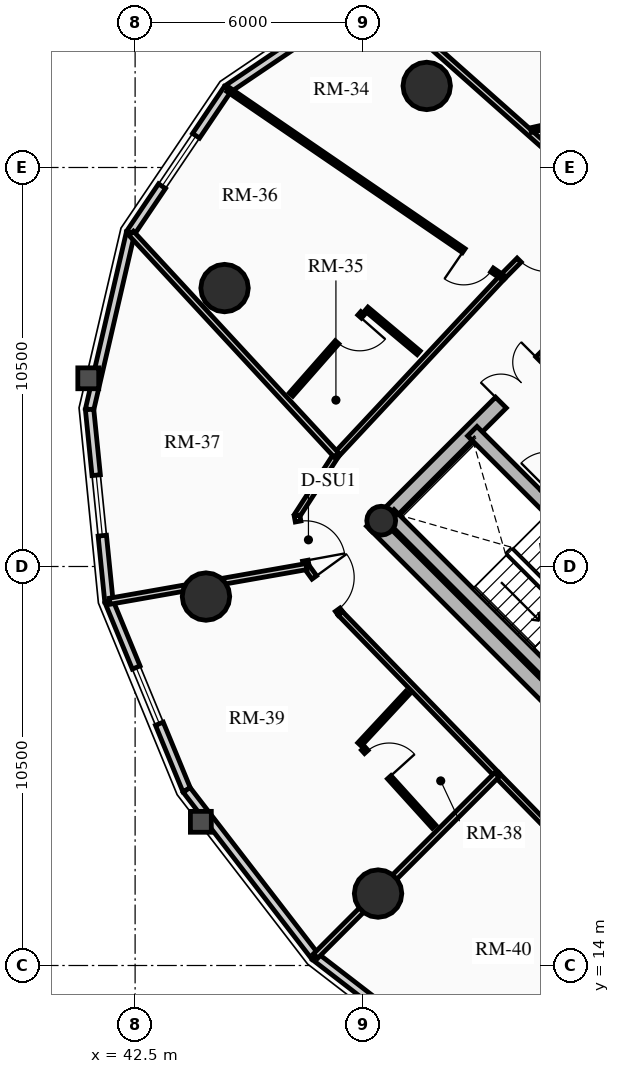
"""IFC4 building model, lengths in metres.
Left out: names, types, materials, properties, quantities, classifications, styles, units other than length and angle.
Written with IfcOpenShell. Run it as: python <this file> out.ifc"""

import sys

from ifc_helpers import new_model, si_unit, direction, frame, frame_2d, origin, origin_2d, place, context, subcontext, project, spatial, rectangle, circle, hollow_circle, extrude, source, transform, mapped, element, fill, save


model = new_model("IFC4")
c1 = context("Model", 3, precision=1e-05, world=origin(), true_north=direction((0.0, 1.0)))
c2 = subcontext(c1, "Body", "Model", "MODEL_VIEW")
j1 = project(units=[si_unit("LENGTHUNIT", "METRE"), si_unit("PLANEANGLEUNIT", "RADIAN")], contexts=[c1])
p1 = place(None, origin())
s1 = spatial("IfcSite", under=j1, at=p1, CompositionType="ELEMENT")
p2 = place(p1, origin())
s2 = spatial("IfcBuilding", under=s1, at=p2, CompositionType="ELEMENT")
p3 = place(p2, frame((0.0, 0.0, 157.42)))
s3 = spatial("IfcBuildingStorey", under=s2, at=p3, CompositionType="ELEMENT", Elevation=157.42)
p4 = place(p3, frame((58.702, 15.732, 0.0), z_axis=(0.0, 0.0, 1.0), x_axis=(-0.707106781187, 0.707106781187, 0.0)))
e1 = element("IfcWall", 1, at=p4, inside=s3, PredefinedType="SHEAR", context=c2, shape_type="SweptSolid", body=[
    extrude(rectangle(XDim=14.1, YDim=0.4, at=frame_2d((7.05, 0.0))), origin(), (0.0, 0.0, 1.0), 2.91),
])
p5 = place(p3, frame((48.873, 25.561, 0.0), z_axis=(0.0, 0.0, 1.0), x_axis=(0.707106781187, 0.707106781187, 0.0)))
e2 = element("IfcWall", 2, at=p5, inside=s3, PredefinedType="SHEAR", context=c2, shape_type="SweptSolid", body=[
    extrude(rectangle(XDim=10.7, YDim=0.4, at=frame_2d((5.35, 0.0))), origin(), (0.0, 0.0, 1.0), 2.91),
])
m1 = source(origin(), c2, "Body", "SweptSolid", [
    extrude(rectangle(XDim=1.5, YDim=2.02, at=frame_2d((0.75, 1.01))), frame((0.0, 0.21, 0.0), z_axis=(0.0, -1.0, 0.0), x_axis=(1.0, 0.0, 0.0)), (0.0, 0.0, 1.0), 0.42),
])
p6 = place(p5, frame((4.6, 0.0, 0.0)))
e3 = element("IfcOpeningElement", 3, at=p6, cuts=e2, PredefinedType="OPENING", context=c2, shape_type="MappedRepresentation", body=[
    mapped(m1, transform((0.0, 0.0, 0.0), x_axis=(1.0, 0.0, 0.0), y_axis=(0.0, 1.0, 0.0), z_axis=(0.0, 0.0, 1.0), scale=1.0)),
])
p7 = place(p3, frame((61.06, 18.373, 0.0), z_axis=(0.0, 0.0, 1.0), x_axis=(-0.707106781187, 0.707106781187, 0.0)))
e4 = element("IfcWall", 4, at=p7, inside=s3, PredefinedType="SHEAR", context=c2, shape_type="SweptSolid", body=[
    extrude(rectangle(XDim=13.7, YDim=0.35, at=frame_2d((6.85, 0.0))), origin(), (0.0, 0.0, 1.0), 2.91),
])
m2 = source(origin(), c2, "Body", "SweptSolid", [
    extrude(rectangle(XDim=1.1, YDim=2.015, at=frame_2d((0.55, 1.007))), frame((0.0, 0.185, 0.0), z_axis=(0.0, -1.0, 0.0), x_axis=(1.0, 0.0, 0.0)), (0.0, 0.0, 1.0), 0.37),
])
p8 = place(p7, frame((4.85, 0.0, 0.0)))
e5 = element("IfcOpeningElement", 5, at=p8, cuts=e4, PredefinedType="OPENING", context=c2, shape_type="MappedRepresentation", body=[
    mapped(m2, transform((0.0, 0.0, 0.0), x_axis=(1.0, 0.0, 0.0), y_axis=(0.0, 1.0, 0.0), z_axis=(0.0, 0.0, 1.0), scale=1.0)),
])
p9 = place(p7, frame((0.625, 0.0, 0.0)))
e6 = element("IfcOpeningElement", 6, at=p9, cuts=e4, PredefinedType="OPENING", context=c2, shape_type="MappedRepresentation", body=[
    mapped(m2, transform((0.0, 0.0, 0.0), x_axis=(1.0, 0.0, 0.0), y_axis=(0.0, 1.0, 0.0), z_axis=(0.0, 0.0, 1.0), scale=1.0)),
])
p10 = place(p7, frame((2.625, 0.0, 0.0)))
e7 = element("IfcOpeningElement", 7, at=p10, cuts=e4, PredefinedType="OPENING", context=c2, shape_type="MappedRepresentation", body=[
    mapped(m2, transform((0.0, 0.0, 0.0), x_axis=(1.0, 0.0, 0.0), y_axis=(0.0, 1.0, 0.0), z_axis=(0.0, 0.0, 1.0), scale=1.0)),
])
m3 = source(origin(), c2, "Body", "SweptSolid", [
    extrude(rectangle(XDim=1.15, YDim=2.02, at=frame_2d((0.575, 1.01))), frame((0.0, 0.185, 0.0), z_axis=(0.0, -1.0, 0.0), x_axis=(1.0, 0.0, 0.0)), (0.0, 0.0, 1.0), 0.37),
])
p11 = place(p7, frame((7.27, 0.0, 0.0)))
e8 = element("IfcOpeningElement", 8, at=p11, cuts=e4, PredefinedType="OPENING", context=c2, shape_type="MappedRepresentation", body=[
    mapped(m3, transform((0.0, 0.0, 0.0), x_axis=(1.0, 0.0, 0.0), y_axis=(0.0, 1.0, 0.0), z_axis=(0.0, 0.0, 1.0), scale=1.0)),
])
p12 = place(p3, frame((53.922, 21.141, 0.0), z_axis=(0.0, 0.0, 1.0), x_axis=(-0.707106781187, 0.707106781187, 0.0)))
e9 = element("IfcWall", 9, at=p12, inside=s3, PredefinedType="SHEAR", context=c2, shape_type="SweptSolid", body=[
    extrude(rectangle(XDim=6.695, YDim=0.35, at=frame_2d((3.348, 0.0))), origin(), (0.0, 0.0, 1.0), 2.91),
])
p13 = place(p3, frame((48.976, 25.706, 0.0), z_axis=(0.0, 0.0, 1.0), x_axis=(0.707106781187, 0.707106781187, 0.0)))
e10 = element("IfcColumn", 10, at=p13, inside=s3, PredefinedType="COLUMN", context=c2, shape_type="SweptSolid", body=[
    extrude(hollow_circle(Radius=0.38, WallThickness=0.032, at=origin_2d()), origin(), (0.0, 0.0, 1.0), 2.91),
])
for number, where, z_axis, x_axis in (
    (11, (50.173, 37.146, 0.0), (0.0, 0.0, 1.0), (1.0, 0.0, 0.0)),
    (12, (44.854, 31.827, 0.0), (0.0, 0.0, 1.0), (1.0, 0.0, 0.0)),
    (13, (44.365, 23.709, 0.0), (0.0, 0.0, 1.0), (1.0, 0.0, 0.0)),
    (14, (48.893, 15.893, 0.0), (0.0, 0.0, 1.0), (1.0, 0.0, 0.0)),
):
    element("IfcColumn", number, at=place(p3, frame(where, z_axis=z_axis, x_axis=x_axis)), inside=s3, PredefinedType="USERDEFINED", context=c2, shape_type="SweptSolid", body=[
        extrude(circle(Radius=0.625, at=origin_2d()), origin(), (0.0, 0.0, 1.0), 2.91),
    ])
p14 = place(p3, frame((44.935, 37.065, 0.0), z_axis=(0.0, 0.0, 1.0), x_axis=(0.828739009952, 0.559635286042, 0.0)))
e15 = element("IfcWall", 15, at=p14, inside=s3, PredefinedType="SOLIDWALL", context=c2, shape_type="SweptSolid", body=[
    extrude(rectangle(XDim=4.569, YDim=0.22, at=frame_2d((2.284, 0.0))), origin(), (0.0, 0.0, 1.0), 2.245),
])
p15 = place(p3, frame((42.378, 33.279, 0.0), z_axis=(0.0, 0.0, 1.0), x_axis=(0.559635286042, 0.828739009952, 0.0)))
e16 = element("IfcWall", 16, at=p15, inside=s3, PredefinedType="SOLIDWALL", context=c2, shape_type="SweptSolid", body=[
    extrude(rectangle(XDim=4.569, YDim=0.22, at=frame_2d((2.284, 0.0))), origin(), (0.0, 0.0, 1.0), 2.245),
])
m4 = source(origin(), c2, "Body", "SweptSolid", [
    extrude(rectangle(XDim=1.6, YDim=1.3, at=frame_2d((0.8, 0.65))), frame((0.0, 0.12, 0.0), z_axis=(0.0, -1.0, 0.0), x_axis=(1.0, 0.0, 0.0)), (0.0, 0.0, 1.0), 0.24),
])
p16 = place(p15, frame((1.484, 0.0, 0.65)))
e17 = element("IfcOpeningElement", 17, at=p16, cuts=e16, PredefinedType="OPENING", context=c2, shape_type="MappedRepresentation", body=[
    mapped(m4, transform((0.0, 0.0, 0.0), x_axis=(1.0, 0.0, 0.0), y_axis=(0.0, 1.0, 0.0), z_axis=(0.0, 0.0, 1.0), scale=1.0)),
])
p17 = place(p3, frame((41.302, 28.633, 0.0), z_axis=(0.0, 0.0, 1.0), x_axis=(0.225659540039, 0.974206226622, 0.0)))
e18 = element("IfcWall", 18, at=p17, inside=s3, PredefinedType="SOLIDWALL", context=c2, shape_type="SweptSolid", body=[
    extrude(rectangle(XDim=4.769, YDim=0.22, at=frame_2d((2.385, 0.0))), origin(), (0.0, 0.0, 1.0), 2.245),
])
p18 = place(p3, frame((41.811, 23.582, 0.0), z_axis=(0.0, 0.0, 1.0), x_axis=(-0.100279889424, 0.994959267396, 0.0)))
e19 = element("IfcWall", 19, at=p18, inside=s3, PredefinedType="SOLIDWALL", context=c2, shape_type="SweptSolid", body=[
    extrude(rectangle(XDim=5.076, YDim=0.22, at=frame_2d((2.538, 0.0))), origin(), (0.0, 0.0, 1.0), 2.245),
])
p19 = place(p18, frame((1.738, 0.0, 0.65)))
e20 = element("IfcOpeningElement", 20, at=p19, cuts=e19, PredefinedType="OPENING", context=c2, shape_type="MappedRepresentation", body=[
    mapped(m4, transform((0.0, 0.0, 0.0), x_axis=(1.0, 0.0, 0.0), y_axis=(0.0, 1.0, 0.0), z_axis=(0.0, 0.0, 1.0), scale=1.0)),
])
p20 = place(p3, frame((43.856, 18.622, 0.0), z_axis=(0.0, 0.0, 1.0), x_axis=(-0.38111364655, 0.924528197738, 0.0)))
e21 = element("IfcWall", 21, at=p20, inside=s3, PredefinedType="SOLIDWALL", context=c2, shape_type="SweptSolid", body=[
    extrude(rectangle(XDim=5.366, YDim=0.22, at=frame_2d((2.683, 0.0))), origin(), (0.0, 0.0, 1.0), 2.245),
])
p21 = place(p20, frame((1.883, 0.0, 0.65)))
e22 = element("IfcOpeningElement", 22, at=p21, cuts=e21, PredefinedType="OPENING", context=c2, shape_type="MappedRepresentation", body=[
    mapped(m4, transform((0.0, 0.0, 0.0), x_axis=(1.0, 0.0, 0.0), y_axis=(0.0, 1.0, 0.0), z_axis=(0.0, 0.0, 1.0), scale=1.0)),
])
p22 = place(p3, frame((47.236, 14.236, 0.0), z_axis=(0.0, 0.0, 1.0), x_axis=(-0.610543584779, 0.791982658323, 0.0)))
e23 = element("IfcWall", 23, at=p22, inside=s3, PredefinedType="SOLIDWALL", context=c2, shape_type="SweptSolid", body=[
    extrude(rectangle(XDim=5.537, YDim=0.22, at=frame_2d((2.769, 0.0))), origin(), (0.0, 0.0, 1.0), 2.245),
])
p23 = place(p3, frame((51.622, 10.856, 0.0), z_axis=(0.0, 0.0, 1.0), x_axis=(-0.791982658323, 0.610543584779, 0.0)))
e24 = element("IfcWall", 24, at=p23, inside=s3, PredefinedType="SOLIDWALL", context=c2, shape_type="SweptSolid", body=[
    extrude(rectangle(XDim=5.537, YDim=0.22, at=frame_2d((2.769, 0.0))), origin(), (0.0, 0.0, 1.0), 2.245),
])
p24 = place(p23, frame((1.968, 0.0, 0.65)))
e25 = element("IfcOpeningElement", 25, at=p24, cuts=e24, PredefinedType="OPENING", context=c2, shape_type="MappedRepresentation", body=[
    mapped(m4, transform((0.0, 0.0, 0.0), x_axis=(1.0, 0.0, 0.0), y_axis=(0.0, 1.0, 0.0), z_axis=(0.0, 0.0, 1.0), scale=1.0)),
])
p25 = place(p3, frame((54.501, 34.479, 0.0), z_axis=(0.0, 0.0, 1.0), x_axis=(-0.70346073929, -0.710734119258, 0.0)))
e26 = element("IfcWall", 26, at=p25, inside=s3, PredefinedType="PARTITIONING", context=c2, shape_type="SweptSolid", body=[
    extrude(rectangle(XDim=3.323, YDim=0.15, at=frame_2d((1.662, 0.0))), origin(), (0.0, 0.0, 1.0), 2.245),
])
m5 = source(origin(), c2, "Body", "SweptSolid", [
    extrude(rectangle(XDim=1.05, YDim=2.015, at=frame_2d((0.525, 1.007))), frame((0.0, 0.085, 0.0), z_axis=(0.0, -1.0, 0.0), x_axis=(1.0, 0.0, 0.0)), (0.0, 0.0, 1.0), 0.17),
])
p26 = place(p25, frame((1.645, 0.0, 0.0)))
e27 = element("IfcOpeningElement", 27, at=p26, cuts=e26, PredefinedType="OPENING", context=c2, shape_type="MappedRepresentation", body=[
    mapped(m5, transform((0.0, 0.0, 0.0), x_axis=(1.0, 0.0, 0.0), y_axis=(0.0, 1.0, 0.0), z_axis=(0.0, 0.0, 1.0), scale=1.0)),
])
p27 = place(p3, frame((52.163, 32.117, 0.0), z_axis=(0.0, 0.0, 1.0), x_axis=(-0.682485296115, -0.730899323154, 0.0)))
e28 = element("IfcWall", 28, at=p27, inside=s3, PredefinedType="PARTITIONING", context=c2, shape_type="SweptSolid", body=[
    extrude(rectangle(XDim=6.404, YDim=0.15, at=frame_2d((3.202, 0.0))), origin(), (0.0, 0.0, 1.0), 2.245),
])
p28 = place(p3, frame((47.792, 27.436, 0.0), z_axis=(0.0, 0.0, 1.0), x_axis=(-0.543086162542, -0.839676973637, 0.0)))
e29 = element("IfcWall", 29, at=p28, inside=s3, PredefinedType="PARTITIONING", context=c2, shape_type="SweptSolid", body=[
    extrude(rectangle(XDim=1.901, YDim=0.15, at=frame_2d((0.95, 0.0))), origin(), (0.0, 0.0, 1.0), 2.245),
])
p29 = place(p3, frame((46.76, 25.84, 0.0), z_axis=(0.0, 0.0, 1.0), x_axis=(0.181230731673, -0.983440604153, 0.0)))
e30 = element("IfcWall", 30, at=p29, inside=s3, PredefinedType="PARTITIONING", context=c2, shape_type="SweptSolid", body=[
    extrude(rectangle(XDim=1.365, YDim=0.15, at=frame_2d((0.682, 0.0))), origin(), (0.0, 0.0, 1.0), 2.245),
])
p30 = place(p29, frame((0.157, 0.0, 0.0)))
e31 = element("IfcOpeningElement", 31, at=p30, cuts=e30, PredefinedType="OPENING", context=c2, shape_type="MappedRepresentation", body=[
    mapped(m5, transform((0.0, 0.0, 0.0), x_axis=(1.0, 0.0, 0.0), y_axis=(0.0, 1.0, 0.0), z_axis=(0.0, 0.0, 1.0), scale=1.0)),
])
p31 = place(p3, frame((47.008, 24.498, 0.0), z_axis=(0.0, 0.0, 1.0), x_axis=(0.586941299514, -0.809629489906, 0.0)))
e32 = element("IfcWall", 32, at=p31, inside=s3, PredefinedType="PARTITIONING", context=c2, shape_type="SweptSolid", body=[
    extrude(rectangle(XDim=1.523, YDim=0.15, at=frame_2d((0.761, 0.0))), origin(), (0.0, 0.0, 1.0), 2.245),
])
p32 = place(p31, frame((0.353, 0.0, 0.0)))
e33 = element("IfcOpeningElement", 33, at=p32, cuts=e32, PredefinedType="OPENING", context=c2, shape_type="MappedRepresentation", body=[
    mapped(m5, transform((0.0, 0.0, 0.0), x_axis=(1.0, 0.0, 0.0), y_axis=(0.0, 1.0, 0.0), z_axis=(0.0, 0.0, 1.0), scale=1.0)),
])
p33 = place(p3, frame((47.901, 23.265, 0.0), z_axis=(0.0, 0.0, 1.0), x_axis=(0.696355965374, -0.717696572019, 0.0)))
e34 = element("IfcWall", 34, at=p33, inside=s3, PredefinedType="PARTITIONING", context=c2, shape_type="SweptSolid", body=[
    extrude(rectangle(XDim=5.915, YDim=0.15, at=frame_2d((2.957, 0.0))), origin(), (0.0, 0.0, 1.0), 2.675),
])
p34 = place(p3, frame((52.02, 19.02, 0.0), z_axis=(0.0, 0.0, 1.0), x_axis=(0.699456449804, -0.71467522332, 0.0)))
e35 = element("IfcWall", 35, at=p34, inside=s3, PredefinedType="PARTITIONING", context=c2, shape_type="SweptSolid", body=[
    extrude(rectangle(XDim=6.032, YDim=0.15, at=frame_2d((3.016, 0.0))), origin(), (0.0, 0.0, 1.0), 2.245),
])
p35 = place(p3, frame((54.501, 34.479, 0.0), z_axis=(0.0, 0.0, 1.0), x_axis=(-0.747641382601, 0.66410267506, 0.0)))
e36 = element("IfcWall", 36, at=p35, inside=s3, PredefinedType="PARTITIONING", context=c2, shape_type="SweptSolid", body=[
    extrude(rectangle(XDim=7.718, YDim=0.16, at=frame_2d((3.859, 0.0))), origin(), (0.0, 0.0, 1.0), 2.245),
])
p36 = place(p3, frame((47.792, 27.436, 0.0), z_axis=(0.0, 0.0, 1.0), x_axis=(-0.679077160958, 0.734066897132, 0.0)))
e37 = element("IfcWall", 37, at=p36, inside=s3, PredefinedType="PARTITIONING", context=c2, shape_type="SweptSolid", body=[
    extrude(rectangle(XDim=7.947, YDim=0.16, at=frame_2d((3.974, 0.0))), origin(), (0.0, 0.0, 1.0), 2.245),
])
p37 = place(p3, frame((47.008, 24.498, 0.0), z_axis=(0.0, 0.0, 1.0), x_axis=(-0.984823741496, -0.173557478046, 0.0)))
e38 = element("IfcWall", 38, at=p37, inside=s3, PredefinedType="PARTITIONING", context=c2, shape_type="SweptSolid", body=[
    extrude(rectangle(XDim=5.257, YDim=0.16, at=frame_2d((2.628, 0.0))), origin(), (0.0, 0.0, 1.0), 2.245),
])
p38 = place(p3, frame((52.02, 19.02, 0.0), z_axis=(0.0, 0.0, 1.0), x_axis=(-0.707106781187, -0.707106781187, 0.0)))
e39 = element("IfcWall", 39, at=p38, inside=s3, PredefinedType="PARTITIONING", context=c2, shape_type="SweptSolid", body=[
    extrude(rectangle(XDim=6.745, YDim=0.16, at=frame_2d((3.373, 0.0))), origin(), (0.0, 0.0, 1.0), 2.245),
])
p39 = place(p3, frame((54.858, 36.425, 0.0), z_axis=(0.0, 0.0, 1.0), x_axis=(-0.975061820415, -0.221933427785, 0.0)))
e40 = element("IfcWall", 40, at=p39, inside=s3, PredefinedType="PARTITIONING", context=c2, shape_type="SweptSolid", body=[
    extrude(rectangle(XDim=1.993, YDim=0.125, at=frame_2d((0.997, 0.0))), origin(), (0.0, 0.0, 1.0), 2.312),
])
m6 = source(origin(), c2, "Body", "SweptSolid", [
    extrude(rectangle(XDim=0.9, YDim=2.005, at=frame_2d((0.45, 1.002))), frame((0.0, 0.073, 0.0), z_axis=(0.0, -1.0, 0.0), x_axis=(1.0, 0.0, 0.0)), (0.0, 0.0, 1.0), 0.145),
])
p40 = place(p39, frame((0.44, 0.0, 0.0)))
e41 = element("IfcOpeningElement", 41, at=p40, cuts=e40, PredefinedType="OPENING", context=c2, shape_type="MappedRepresentation", body=[
    mapped(m6, transform((0.0, 0.0, 0.0), x_axis=(1.0, 0.0, 0.0), y_axis=(0.0, 1.0, 0.0), z_axis=(0.0, 0.0, 1.0), scale=1.0)),
])
p41 = place(p3, frame((52.163, 32.117, 0.0), z_axis=(0.0, 0.0, 1.0), x_axis=(-0.825403853282, 0.564542716707, 0.0)))
e42 = element("IfcWall", 42, at=p41, inside=s3, PredefinedType="PARTITIONING", context=c2, shape_type="SweptSolid", body=[
    extrude(rectangle(XDim=8.74, YDim=0.125, at=frame_2d((4.37, 0.0))), origin(), (0.0, 0.0, 1.0), 2.245),
])
p42 = place(p41, frame((0.33, 0.0, 0.0)))
e43 = element("IfcOpeningElement", 43, at=p42, cuts=e42, PredefinedType="OPENING", context=c2, shape_type="MappedRepresentation", body=[
    mapped(m6, transform((0.0, 0.0, 0.0), x_axis=(1.0, 0.0, 0.0), y_axis=(0.0, 1.0, 0.0), z_axis=(0.0, 0.0, 1.0), scale=1.0)),
])
p43 = place(p3, frame((49.961, 30.124, 0.0), z_axis=(0.0, 0.0, 1.0), x_axis=(-0.766210982885, 0.64258908309, 0.0)))
e44 = element("IfcWall", 44, at=p43, inside=s3, PredefinedType="PARTITIONING", context=c2, shape_type="SweptSolid", body=[
    extrude(rectangle(XDim=1.795, YDim=0.125, at=frame_2d((0.897, 0.0))), origin(), (0.0, 0.0, 1.0), 2.675),
])
p44 = place(p3, frame((48.488, 31.166, 0.0), z_axis=(0.0, 0.0, 1.0), x_axis=(-0.660635615229, -0.750706722956, 0.0)))
e45 = element("IfcWall", 45, at=p44, inside=s3, PredefinedType="PARTITIONING", context=c2, shape_type="SweptSolid", body=[
    extrude(rectangle(XDim=2.852, YDim=0.125, at=frame_2d((1.426, 0.0))), origin(), (0.0, 0.0, 1.0), 2.245),
])
p45 = place(p44, frame((0.12, 0.0, 0.0)))
e46 = element("IfcOpeningElement", 46, at=p45, cuts=e45, PredefinedType="OPENING", context=c2, shape_type="MappedRepresentation", body=[
    mapped(m6, transform((0.0, 0.0, 0.0), x_axis=(1.0, 0.0, 0.0), y_axis=(0.0, 1.0, 0.0), z_axis=(0.0, 0.0, 1.0), scale=1.0)),
])
p46 = place(p3, frame((49.665, 21.171, 0.0), z_axis=(0.0, 0.0, 1.0), x_axis=(-0.681089123144, -0.73220052331, 0.0)))
e47 = element("IfcWall", 47, at=p46, inside=s3, PredefinedType="PARTITIONING", context=c2, shape_type="SweptSolid", body=[
    extrude(rectangle(XDim=1.849, YDim=0.125, at=frame_2d((0.924, 0.0))), origin(), (0.0, 0.0, 1.0), 2.675),
])
p47 = place(p3, frame((48.503, 19.711, 0.0), z_axis=(0.0, 0.0, 1.0), x_axis=(0.671201050003, -0.741275354018, 0.0)))
e48 = element("IfcWall", 48, at=p47, inside=s3, PredefinedType="PARTITIONING", context=c2, shape_type="SweptSolid", body=[
    extrude(rectangle(XDim=2.777, YDim=0.125, at=frame_2d((1.388, 0.0))), origin(), (0.0, 0.0, 1.0), 2.675),
])
p48 = place(p47, frame((0.12, 0.0, 0.0)))
e49 = element("IfcOpeningElement", 49, at=p48, cuts=e48, PredefinedType="OPENING", context=c2, shape_type="MappedRepresentation", body=[
    mapped(m6, transform((0.0, 0.0, 0.0), x_axis=(1.0, 0.0, 0.0), y_axis=(0.0, 1.0, 0.0), z_axis=(0.0, 0.0, 1.0), scale=1.0)),
])
m7 = source(origin(), c2, "Body", "SweptSolid", [
    extrude(rectangle(XDim=1.6, YDim=1.3, at=frame_2d((0.8, 0.65))), frame((0.0, 0.03, 0.0), z_axis=(0.0, -1.0, 0.0), x_axis=(1.0, 0.0, 0.0)), (0.0, 0.0, 1.0), 0.06),
])
p49 = place(p16, origin())
e50 = element("IfcWindow", 50, at=p49, inside=s3, PartitioningType="SINGLE_PANEL", PredefinedType="WINDOW", context=c2, shape_type="MappedRepresentation", body=[
    mapped(m7, transform((0.0, 0.0, 0.0), x_axis=(1.0, 0.0, 0.0), y_axis=(0.0, 1.0, 0.0), z_axis=(0.0, 0.0, 1.0), scale=1.0)),
])
fill(e17, e50)
p50 = place(p19, origin())
e51 = element("IfcWindow", 51, at=p50, inside=s3, PartitioningType="SINGLE_PANEL", PredefinedType="WINDOW", context=c2, shape_type="MappedRepresentation", body=[
    mapped(m7, transform((0.0, 0.0, 0.0), x_axis=(1.0, 0.0, 0.0), y_axis=(0.0, 1.0, 0.0), z_axis=(0.0, 0.0, 1.0), scale=1.0)),
])
fill(e20, e51)
p51 = place(p21, origin())
e52 = element("IfcWindow", 52, at=p51, inside=s3, PartitioningType="SINGLE_PANEL", PredefinedType="WINDOW", context=c2, shape_type="MappedRepresentation", body=[
    mapped(m7, transform((0.0, 0.0, 0.0), x_axis=(1.0, 0.0, 0.0), y_axis=(0.0, 1.0, 0.0), z_axis=(0.0, 0.0, 1.0), scale=1.0)),
])
fill(e22, e52)
m8 = source(origin(), c2, "Body", "SweptSolid", [
    extrude(rectangle(XDim=1.5, YDim=2.02, at=frame_2d((0.75, 1.01))), frame((0.0, 0.025, 0.0), z_axis=(0.0, -1.0, 0.0), x_axis=(1.0, 0.0, 0.0)), (0.0, 0.0, 1.0), 0.05),
])
p52 = place(p6, origin())
e53 = element("IfcDoor", 53, at=p52, inside=s3, OperationType="DOUBLE_DOOR_SINGLE_SWING", PredefinedType="DOOR", context=c2, shape_type="MappedRepresentation", body=[
    mapped(m8, transform((0.0, 0.0, 0.0), x_axis=(1.0, 0.0, 0.0), y_axis=(0.0, 1.0, 0.0), z_axis=(0.0, 0.0, 1.0), scale=1.0)),
])
fill(e3, e53)
m9 = source(origin(), c2, "Body", "SweptSolid", [
    extrude(rectangle(XDim=1.05, YDim=2.015, at=frame_2d((0.525, 1.007))), frame((0.0, 0.025, 0.0), z_axis=(0.0, -1.0, 0.0), x_axis=(1.0, 0.0, 0.0)), (0.0, 0.0, 1.0), 0.05),
])
p53 = place(p26, origin())
e54 = element("IfcDoor", 54, at=p53, inside=s3, OperationType="SINGLE_SWING_LEFT", PredefinedType="DOOR", context=c2, shape_type="MappedRepresentation", body=[
    mapped(m9, transform((0.0, 0.0, 0.0), x_axis=(1.0, 0.0, 0.0), y_axis=(0.0, 1.0, 0.0), z_axis=(0.0, 0.0, 1.0), scale=1.0)),
])
fill(e27, e54)
m10 = source(origin(), c2, "Body", "SweptSolid", [
    extrude(rectangle(XDim=0.9, YDim=2.005, at=frame_2d((0.45, 1.002))), frame((0.0, 0.025, 0.0), z_axis=(0.0, -1.0, 0.0), x_axis=(1.0, 0.0, 0.0)), (0.0, 0.0, 1.0), 0.05),
])
p54 = place(p42, origin())
e55 = element("IfcDoor", 55, at=p54, inside=s3, OperationType="SINGLE_SWING_RIGHT", PredefinedType="DOOR", context=c2, shape_type="MappedRepresentation", body=[
    mapped(m10, transform((0.0, 0.0, 0.0), x_axis=(1.0, 0.0, 0.0), y_axis=(0.0, 1.0, 0.0), z_axis=(0.0, 0.0, 1.0), scale=1.0)),
])
fill(e43, e55)
p55 = place(p45, origin())
e56 = element("IfcDoor", 56, at=p55, inside=s3, OperationType="SINGLE_SWING_LEFT", PredefinedType="DOOR", context=c2, shape_type="MappedRepresentation", body=[
    mapped(m10, transform((0.0, 0.0, 0.0), x_axis=(1.0, 0.0, 0.0), y_axis=(0.0, 1.0, 0.0), z_axis=(0.0, 0.0, 1.0), scale=1.0)),
])
fill(e46, e56)
p56 = place(p30, origin())
e57 = element("IfcDoor", 57, at=p56, inside=s3, OperationType="SINGLE_SWING_RIGHT", PredefinedType="DOOR", context=c2, shape_type="MappedRepresentation", body=[
    mapped(m9, transform((0.0, 0.0, 0.0), x_axis=(1.0, 0.0, 0.0), y_axis=(0.0, 1.0, 0.0), z_axis=(0.0, 0.0, 1.0), scale=1.0)),
])
fill(e31, e57)
p57 = place(p32, origin())
e58 = element("IfcDoor", 58, at=p57, inside=s3, OperationType="SINGLE_SWING_LEFT", PredefinedType="DOOR", context=c2, shape_type="MappedRepresentation", body=[
    mapped(m9, transform((0.0, 0.0, 0.0), x_axis=(1.0, 0.0, 0.0), y_axis=(0.0, 1.0, 0.0), z_axis=(0.0, 0.0, 1.0), scale=1.0)),
])
fill(e33, e58)
p58 = place(p48, origin())
e59 = element("IfcDoor", 59, at=p58, inside=s3, OperationType="SINGLE_SWING_RIGHT", PredefinedType="DOOR", context=c2, shape_type="MappedRepresentation", body=[
    mapped(m10, transform((0.0, 0.0, 0.0), x_axis=(1.0, 0.0, 0.0), y_axis=(0.0, 1.0, 0.0), z_axis=(0.0, 0.0, 1.0), scale=1.0)),
])
fill(e49, e59)
save(model, sys.argv[1])
